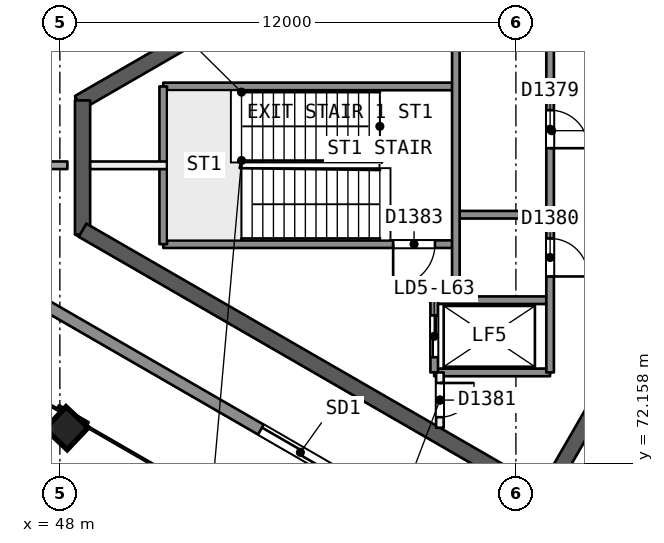
"""IFC4 building model, lengths in metres.
Left out: names, types, materials, properties, quantities, classifications, styles, units other than length and angle.
Written with IfcOpenShell. Run it as: python <this file> out.ifc"""

import sys

from ifc_helpers import new_model, si_unit, direction, frame, frame_2d, origin, origin_2d, place, context, subcontext, project, spatial, rectangle, extrude, element, fill, save


model = new_model("IFC4")
c1 = context("Model", 3, precision=1e-05, world=origin(), true_north=direction((0.0, 1.0)))
c2 = subcontext(c1, "Body", "Model", "MODEL_VIEW")
j1 = project(units=[si_unit("LENGTHUNIT", "METRE"), si_unit("PLANEANGLEUNIT", "RADIAN")], contexts=[c1])
p1 = place(None, origin())
s1 = spatial("IfcSite", under=j1, at=p1, CompositionType="ELEMENT")
p2 = place(p1, origin())
s2 = spatial("IfcBuilding", under=s1, at=p2, CompositionType="ELEMENT")
p3 = place(p2, frame((0.0, 0.0, 259.0)))
s3 = spatial("IfcBuildingStorey", under=s2, at=p3, CompositionType="ELEMENT", Elevation=259.0)
p4 = place(p3, frame((65.769, 80.0, 0.0), z_axis=(0.0, 0.0, 1.0), x_axis=(-0.50000177223, 0.866024380585, 0.0)))
e1 = element("IfcWall", 1, at=p4, inside=s3, PredefinedType="SHEAR", context=c2, shape_type="SweptSolid", body=[
    extrude(rectangle(XDim=10.265, YDim=0.4, at=frame_2d((5.132, 0.0))), origin(), (0.0, 0.0, 1.0), 3.7),
])
p5 = place(p4, frame((0.834, 0.0, 0.0)))
e2 = element("IfcOpeningElement", 2, at=p5, cuts=e1, PredefinedType="OPENING", context=c2, shape_type="SweptSolid", body=[
    extrude(rectangle(XDim=1.2, YDim=2.1, at=frame_2d((0.6, 1.05))), frame((0.0, 0.21, 0.0), z_axis=(0.0, -1.0, 0.0), x_axis=(1.0, 0.0, 0.0)), (0.0, 0.0, 1.0), 0.421),
])
p6 = place(p3, frame((60.737, 88.716, 0.0), z_axis=(0.0, 0.0, 1.0), x_axis=(-0.866028812667, -0.499994095595, 0.0)))
e3 = element("IfcWall", 3, at=p6, inside=s3, PredefinedType="SHEAR", context=c2, shape_type="SweptSolid", body=[
    extrude(rectangle(XDim=14.134, YDim=0.4, at=frame_2d((7.067, 0.0))), origin(), (0.0, 0.0, 1.0), 3.7),
])
p7 = place(p3, frame((48.597, 81.707, 0.0), z_axis=(0.0, 0.0, 1.0), x_axis=(0.0, -1.0, 0.0)))
e4 = element("IfcWall", 4, at=p7, inside=s3, PredefinedType="SHEAR", context=c2, shape_type="SweptSolid", body=[
    extrude(rectangle(XDim=3.53, YDim=0.4, at=frame_2d((1.765, 0.0))), origin(), (0.0, 0.0, 1.0), 3.7),
])
p8 = place(p3, frame((48.597, 78.293, 0.0), z_axis=(0.0, 0.0, 1.0), x_axis=(0.866026024469, -0.499998924941, 0.0)))
e5 = element("IfcWall", 5, at=p8, inside=s3, PredefinedType="SHEAR", context=c2, shape_type="SweptSolid", body=[
    extrude(rectangle(XDim=14.218, YDim=0.4, at=frame_2d((7.109, 0.0))), origin(), (0.0, 0.0, 1.0), 3.7),
])
p9 = place(p3, frame((60.737, 71.284, 0.0), z_axis=(0.0, 0.0, 1.0), x_axis=(0.50000547566, 0.866022242388, 0.0)))
e6 = element("IfcWall", 6, at=p9, inside=s3, PredefinedType="SHEAR", context=c2, shape_type="SweptSolid", body=[
    extrude(rectangle(XDim=10.18, YDim=0.4, at=frame_2d((5.09, 0.0))), origin(), (0.0, 0.0, 1.0), 3.7),
])
p10 = place(p9, frame((8.03, 0.0, 0.0)))
e7 = element("IfcOpeningElement", 7, at=p10, cuts=e6, PredefinedType="OPENING", context=c2, shape_type="SweptSolid", body=[
    extrude(rectangle(XDim=1.2, YDim=2.1, at=frame_2d((0.6, 1.05))), frame((0.0, 0.21, 0.0), z_axis=(0.0, -1.0, 0.0), x_axis=(1.0, 0.0, 0.0)), (0.0, 0.0, 1.0), 0.421),
])
p11 = place(p3, frame((48.143, 73.074, 0.0), z_axis=(0.028559101991, 0.006859460986, 0.999568569678), x_axis=(-0.866414848315, 0.498869008806, 0.021331260469)))
e8 = element("IfcColumn", 8, at=p11, inside=s3, PredefinedType="COLUMN", context=c2, shape_type="SweptSolid", body=[
    extrude(rectangle(XDim=0.8, YDim=0.8, at=origin_2d()), origin(), (0.0, 0.0, 1.0), 3.702),
])
p12 = place(p3, frame((45.695, 80.001, 0.0), z_axis=(0.0, 0.0, 1.0), x_axis=(1.0, 0.0, 0.0)))
e9 = element("IfcWall", 9, at=p12, inside=s3, PredefinedType="PARTITIONING", context=c2, shape_type="SweptSolid", body=[
    extrude(rectangle(XDim=2.503, YDim=0.2, at=frame_2d((1.251, 0.0))), origin(), (0.0, 0.0, 1.0), 3.3),
])
p13 = place(p3, frame((45.546, 82.482, 0.0), z_axis=(0.0, 0.0, 1.0), x_axis=(0.86602550179, 0.499999830249, 0.0)))
e10 = element("IfcWall", 10, at=p13, inside=s3, PredefinedType="SOLIDWALL", context=c2, shape_type="SweptSolid", body=[
    extrude(rectangle(XDim=48.533, YDim=0.3, at=frame_2d((24.267, 0.0))), origin(), (0.0, 0.0, 1.0), 3.3),
])
p14 = place(p13, frame((34.854, 0.0, 0.0)))
e11 = element("IfcOpeningElement", 11, at=p14, cuts=e10, PredefinedType="OPENING", context=c2, shape_type="SweptSolid", body=[
    extrude(rectangle(XDim=2.4, YDim=2.4, at=frame_2d((1.2, 1.2))), frame((0.0, 0.161, 0.0), z_axis=(0.0, -1.0, 0.0), x_axis=(1.0, 0.0, 0.0)), (0.0, 0.0, 1.0), 0.321),
])
p15 = place(p13, frame((10.5, 0.0, 0.0)))
e12 = element("IfcOpeningElement", 12, at=p15, cuts=e10, PredefinedType="OPENING", context=c2, shape_type="SweptSolid", body=[
    extrude(rectangle(XDim=2.4, YDim=2.4, at=frame_2d((1.2, 1.2))), frame((0.0, 0.161, 0.0), z_axis=(0.0, -1.0, 0.0), x_axis=(1.0, 0.0, 0.0)), (0.0, 0.0, 1.0), 0.321),
])
p16 = place(p3, frame((87.577, 53.251, 0.0), z_axis=(0.0, 0.0, 1.0), x_axis=(-0.86602550179, 0.499999830249, 0.0)))
e13 = element("IfcWall", 13, at=p16, inside=s3, PredefinedType="SOLIDWALL", context=c2, shape_type="SweptSolid", body=[
    extrude(rectangle(XDim=48.533, YDim=0.3, at=frame_2d((24.267, 0.0))), origin(), (0.0, 0.0, 1.0), 3.3),
])
p17 = place(p16, frame((37.192, 0.0, 0.0)))
e14 = element("IfcOpeningElement", 14, at=p17, cuts=e13, PredefinedType="OPENING", context=c2, shape_type="SweptSolid", body=[
    extrude(rectangle(XDim=2.4, YDim=2.4, at=frame_2d((1.2, 1.2))), frame((0.0, 0.161, 0.0), z_axis=(0.0, -1.0, 0.0), x_axis=(1.0, 0.0, 0.0)), (0.0, 0.0, 1.0), 0.321),
])
p18 = place(p16, frame((8.941, 0.0, 0.0)))
e15 = element("IfcOpeningElement", 15, at=p18, cuts=e13, PredefinedType="OPENING", context=c2, shape_type="SweptSolid", body=[
    extrude(rectangle(XDim=2.4, YDim=2.4, at=frame_2d((1.2, 1.2))), frame((0.0, 0.161, 0.0), z_axis=(0.0, -1.0, 0.0), x_axis=(1.0, 0.0, 0.0)), (0.0, 0.0, 1.0), 0.321),
])
p19 = place(p16, frame((25.015, 0.0, 0.0)))
e16 = element("IfcOpeningElement", 16, at=p19, cuts=e13, PredefinedType="OPENING", context=c2, shape_type="SweptSolid", body=[
    extrude(rectangle(XDim=2.4, YDim=2.4, at=frame_2d((1.2, 1.2))), frame((0.0, 0.161, 0.0), z_axis=(0.0, -1.0, 0.0), x_axis=(1.0, 0.0, 0.0)), (0.0, 0.0, 1.0), 0.321),
])
p20 = place(p16, frame((21.118, 0.0, 0.0)))
e17 = element("IfcOpeningElement", 17, at=p20, cuts=e13, PredefinedType="OPENING", context=c2, shape_type="SweptSolid", body=[
    extrude(rectangle(XDim=2.4, YDim=2.4, at=frame_2d((1.2, 1.2))), frame((0.0, 0.161, 0.0), z_axis=(0.0, -1.0, 0.0), x_axis=(1.0, 0.0, 0.0)), (0.0, 0.0, 1.0), 0.321),
])
p21 = place(p3, frame((58.42, 82.075, 0.0), z_axis=(0.0, 0.0, 1.0), x_axis=(-1.0, 0.0, 0.0)))
e18 = element("IfcWall", 18, at=p21, inside=s3, PredefinedType="SOLIDWALL", context=c2, shape_type="SweptSolid", body=[
    extrude(rectangle(XDim=7.7, YDim=0.2, at=frame_2d((3.85, 0.0))), origin(), (0.0, 0.0, 1.0), 3.3),
])
p22 = place(p3, frame((50.82, 80.0, 0.0), z_axis=(0.0, 0.0, 1.0), x_axis=(-1.0, 0.0, 0.0)))
e19 = element("IfcWall", 19, at=p22, inside=s3, PredefinedType="PARTITIONING", context=c2, shape_type="SweptSolid", body=[
    extrude(rectangle(XDim=2.023, YDim=0.2, at=frame_2d((1.012, 0.0))), origin(), (0.0, 0.0, 1.0), 3.3),
])
p23 = place(p3, frame((60.9, 78.7, 0.0), z_axis=(0.0, 0.0, 1.0), x_axis=(-1.0, 0.0, 0.0)))
e20 = element("IfcWall", 20, at=p23, inside=s3, PredefinedType="SOLIDWALL", context=c2, shape_type="SweptSolid", body=[
    extrude(rectangle(XDim=2.48, YDim=0.2, at=frame_2d((1.24, 0.0))), origin(), (0.0, 0.0, 1.0), 3.3),
])
p24 = place(p3, frame((58.42, 77.925, 0.0), z_axis=(0.0, 0.0, 1.0), x_axis=(-1.0, 0.0, 0.0)))
e21 = element("IfcWall", 21, at=p24, inside=s3, PredefinedType="SOLIDWALL", context=c2, shape_type="SweptSolid", body=[
    extrude(rectangle(XDim=7.7, YDim=0.2, at=frame_2d((3.85, 0.0))), origin(), (0.0, 0.0, 1.0), 3.3),
])
p25 = place(p24, frame((0.55, 0.0, 0.0)))
e22 = element("IfcOpeningElement", 22, at=p25, cuts=e21, PredefinedType="OPENING", context=c2, shape_type="SweptSolid", body=[
    extrude(rectangle(XDim=1.1, YDim=2.1, at=frame_2d((0.55, 1.05))), frame((0.0, 0.11, 0.0), z_axis=(0.0, -1.0, 0.0), x_axis=(1.0, 0.0, 0.0)), (0.0, 0.0, 1.0), 0.221),
])
for number, where, z_axis, x_axis in (
    (23, (60.9, 76.45, 0.0), (0.0, 0.0, 1.0), (-1.0, 0.0, 0.0)),
    (24, (60.9, 74.55, 0.0), (0.0, 0.0, 1.0), (-1.0, 0.0, 0.0)),
):
    element("IfcWall", number, at=place(p3, frame(where, z_axis=z_axis, x_axis=x_axis)), inside=s3, PredefinedType="SOLIDWALL", context=c2, shape_type="SweptSolid", body=[
        extrude(rectangle(XDim=3.05, YDim=0.2, at=frame_2d((1.525, 0.0))), origin(), (0.0, 0.0, 1.0), 3.3),
    ])
p26 = place(p3, frame((60.9, 85.45, 0.0), z_axis=(0.0, 0.0, 1.0), x_axis=(0.0, -1.0, 0.0)))
e25 = element("IfcWall", 25, at=p26, inside=s3, PredefinedType="SOLIDWALL", context=c2, shape_type="SweptSolid", body=[
    extrude(rectangle(XDim=10.9, YDim=0.2, at=frame_2d((5.45, 0.0))), origin(), (0.0, 0.0, 1.0), 3.3),
])
p27 = place(p26, frame((0.625, 0.0, 0.0)))
e26 = element("IfcOpeningElement", 26, at=p27, cuts=e25, PredefinedType="OPENING", context=c2, shape_type="SweptSolid", body=[
    extrude(rectangle(XDim=1.0, YDim=2.1, at=frame_2d((0.5, 1.05))), frame((0.0, 0.11, 0.0), z_axis=(0.0, -1.0, 0.0), x_axis=(1.0, 0.0, 0.0)), (0.0, 0.0, 1.0), 0.221),
])
p28 = place(p26, frame((4.0, 0.0, 0.0)))
e27 = element("IfcOpeningElement", 27, at=p28, cuts=e25, PredefinedType="OPENING", context=c2, shape_type="SweptSolid", body=[
    extrude(rectangle(XDim=1.0, YDim=2.1, at=frame_2d((0.5, 1.05))), frame((0.0, 0.11, 0.0), z_axis=(0.0, -1.0, 0.0), x_axis=(1.0, 0.0, 0.0)), (0.0, 0.0, 1.0), 0.221),
])
p29 = place(p26, frame((7.375, 0.0, 0.0)))
e28 = element("IfcOpeningElement", 28, at=p29, cuts=e25, PredefinedType="OPENING", context=c2, shape_type="SweptSolid", body=[
    extrude(rectangle(XDim=1.0, YDim=2.1, at=frame_2d((0.5, 1.05))), frame((0.0, 0.11, 0.0), z_axis=(0.0, -1.0, 0.0), x_axis=(1.0, 0.0, 0.0)), (0.0, 0.0, 1.0), 0.221),
])
p30 = place(p3, frame((58.42, 87.148, 0.0), z_axis=(0.0, 0.0, 1.0), x_axis=(0.0, -1.0, 0.0)))
e29 = element("IfcWall", 29, at=p30, inside=s3, PredefinedType="SOLIDWALL", context=c2, shape_type="SweptSolid", body=[
    extrude(rectangle(XDim=10.698, YDim=0.2, at=frame_2d((5.349, 0.0))), origin(), (0.0, 0.0, 1.0), 3.3),
])
p31 = place(p30, frame((0.399, 0.0, 0.0)))
e30 = element("IfcOpeningElement", 30, at=p31, cuts=e29, PredefinedType="OPENING", context=c2, shape_type="SweptSolid", body=[
    extrude(rectangle(XDim=0.9, YDim=2.1, at=frame_2d((0.45, 1.05))), frame((0.0, 0.11, 0.0), z_axis=(0.0, -1.0, 0.0), x_axis=(1.0, 0.0, 0.0)), (0.0, 0.0, 1.0), 0.221),
])
p32 = place(p3, frame((58.0, 74.55, 0.0), z_axis=(0.0, 0.0, 1.0), x_axis=(0.0, -1.0, 0.0)))
e31 = element("IfcWall", 31, at=p32, inside=s3, PredefinedType="PARTITIONING", context=c2, shape_type="SweptSolid", body=[
    extrude(rectangle(XDim=1.455, YDim=0.2, at=frame_2d((0.728, 0.0))), origin(), (0.0, 0.0, 1.0), 3.3),
])
p33 = place(p32, frame((0.278, 0.0, 0.0)))
e32 = element("IfcOpeningElement", 32, at=p33, cuts=e31, PredefinedType="OPENING", context=c2, shape_type="SweptSolid", body=[
    extrude(rectangle(XDim=0.9, YDim=2.1, at=frame_2d((0.45, 1.05))), frame((0.0, 0.11, 0.0), z_axis=(0.0, -1.0, 0.0), x_axis=(1.0, 0.0, 0.0)), (0.0, 0.0, 1.0), 0.221),
])
p34 = place(p3, frame((57.85, 76.45, 0.0), z_axis=(0.0, 0.0, 1.0), x_axis=(0.0, -1.0, 0.0)))
e33 = element("IfcWall", 33, at=p34, inside=s3, PredefinedType="SOLIDWALL", context=c2, shape_type="SweptSolid", body=[
    extrude(rectangle(XDim=1.9, YDim=0.2, at=frame_2d((0.95, 0.0))), origin(), (0.0, 0.0, 1.0), 3.3),
])
p35 = place(p34, frame((0.4, 0.0, 0.0)))
e34 = element("IfcOpeningElement", 34, at=p35, cuts=e33, PredefinedType="OPENING", context=c2, shape_type="SweptSolid", body=[
    extrude(rectangle(XDim=1.1, YDim=2.1, at=frame_2d((0.55, 1.05))), frame((0.0, 0.11, 0.0), z_axis=(0.0, -1.0, 0.0), x_axis=(1.0, 0.0, 0.0)), (0.0, 0.0, 1.0), 0.221),
])
p36 = place(p3, frame((50.72, 82.075, 0.0), z_axis=(0.0, 0.0, 1.0), x_axis=(0.0, -1.0, 0.0)))
e35 = element("IfcWall", 35, at=p36, inside=s3, PredefinedType="SOLIDWALL", context=c2, shape_type="SweptSolid", body=[
    extrude(rectangle(XDim=4.15, YDim=0.2, at=frame_2d((2.075, 0.0))), origin(), (0.0, 0.0, 1.0), 3.3),
])
p37 = place(p17, origin())
e36 = element("IfcDoor", 36, at=p37, inside=s3, OperationType="SLIDING_TO_LEFT", PredefinedType="NOTDEFINED", context=c2, shape_type="SweptSolid", body=[
    extrude(rectangle(XDim=2.4, YDim=2.4, at=frame_2d((1.2, 1.2))), frame((0.0, 0.025, 0.0), z_axis=(0.0, -1.0, 0.0), x_axis=(1.0, 0.0, 0.0)), (0.0, 0.0, 1.0), 0.05),
])
fill(e14, e36)
p38 = place(p35, origin())
e37 = element("IfcDoor", 37, at=p38, inside=s3, OperationType="SLIDING_TO_RIGHT", PredefinedType="NOTDEFINED", context=c2, shape_type="SweptSolid", body=[
    extrude(rectangle(XDim=1.1, YDim=2.1, at=frame_2d((0.55, 1.05))), frame((0.0, 0.025, 0.0), z_axis=(0.0, -1.0, 0.0), x_axis=(1.0, 0.0, 0.0)), (0.0, 0.0, 1.0), 0.05),
])
fill(e34, e37)
p39 = place(p28, origin())
e38 = element("IfcDoor", 38, at=p39, inside=s3, OperationType="SINGLE_SWING_RIGHT", PredefinedType="NOTDEFINED", context=c2, shape_type="SweptSolid", body=[
    extrude(rectangle(XDim=1.0, YDim=2.1, at=frame_2d((0.5, 1.05))), frame((0.0, 0.025, 0.0), z_axis=(0.0, -1.0, 0.0), x_axis=(1.0, 0.0, 0.0)), (0.0, 0.0, 1.0), 0.05),
])
fill(e27, e38)
p40 = place(p29, origin())
e39 = element("IfcDoor", 39, at=p40, inside=s3, OperationType="SINGLE_SWING_RIGHT", PredefinedType="NOTDEFINED", context=c2, shape_type="SweptSolid", body=[
    extrude(rectangle(XDim=1.0, YDim=2.1, at=frame_2d((0.5, 1.05))), frame((0.0, 0.025, 0.0), z_axis=(0.0, -1.0, 0.0), x_axis=(1.0, 0.0, 0.0)), (0.0, 0.0, 1.0), 0.05),
])
fill(e28, e39)
p41 = place(p33, origin())
e40 = element("IfcDoor", 40, at=p41, inside=s3, OperationType="SINGLE_SWING_LEFT", PredefinedType="NOTDEFINED", context=c2, shape_type="SweptSolid", body=[
    extrude(rectangle(XDim=0.9, YDim=2.1, at=frame_2d((0.45, 1.05))), frame((0.0, 0.025, 0.0), z_axis=(0.0, -1.0, 0.0), x_axis=(1.0, 0.0, 0.0)), (0.0, 0.0, 1.0), 0.05),
])
fill(e32, e40)
p42 = place(p25, origin())
e41 = element("IfcDoor", 41, at=p42, inside=s3, OperationType="SINGLE_SWING_RIGHT", PredefinedType="NOTDEFINED", context=c2, shape_type="SweptSolid", body=[
    extrude(rectangle(XDim=1.1, YDim=2.1, at=frame_2d((0.55, 1.05))), frame((0.0, 0.025, 0.0), z_axis=(0.0, -1.0, 0.0), x_axis=(1.0, 0.0, 0.0)), (0.0, 0.0, 1.0), 0.05),
])
fill(e22, e41)
save(model, sys.argv[1])
